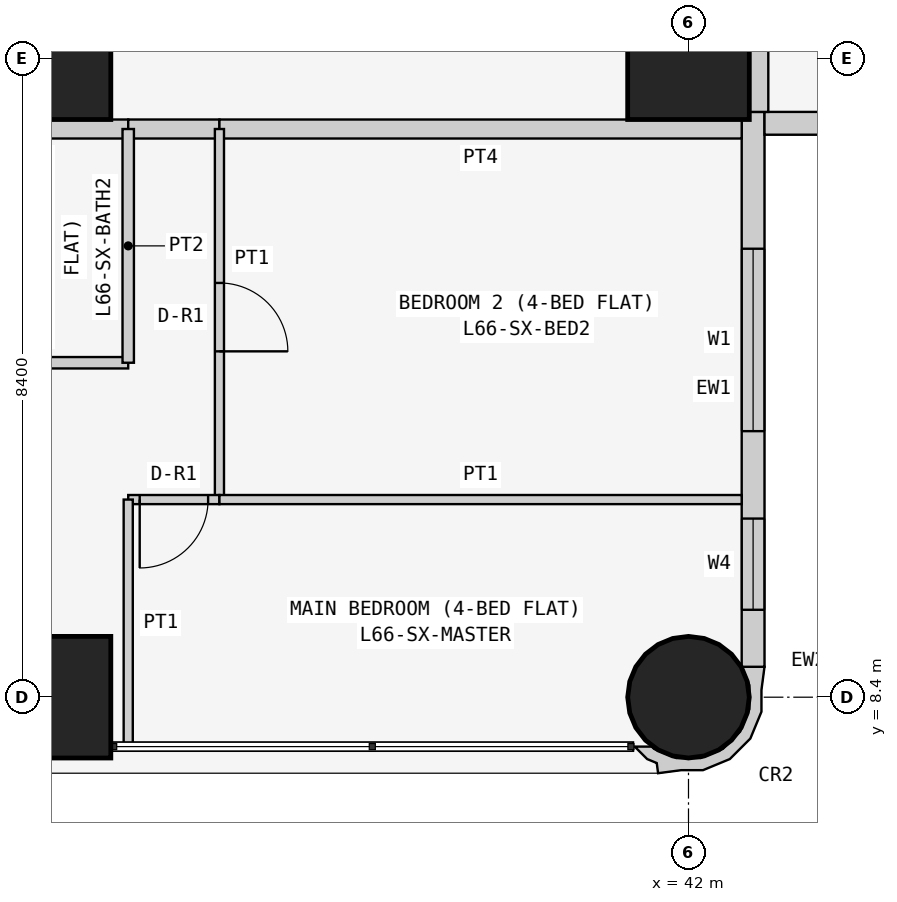
"""IFC4 building model, lengths in metres.
Left out: names, types, materials, properties, quantities, classifications, styles, units other than length and angle.
Written with IfcOpenShell. Run it as: python <this file> out.ifc"""

import sys

from ifc_helpers import new_model, si_unit, direction, frame, frame_2d, origin, origin_2d, place, context, subcontext, project, spatial, polyline, rectangle, circle, outline, extrude, element, fill, save


model = new_model("IFC4")
c1 = context("Model", 3, precision=1e-05, world=origin(), true_north=direction((0.0, 1.0)))
c2 = subcontext(c1, "Body", "Model", "MODEL_VIEW")
j1 = project(units=[si_unit("LENGTHUNIT", "METRE"), si_unit("PLANEANGLEUNIT", "RADIAN")], contexts=[c1])
p1 = place(None, origin())
s1 = spatial("IfcSite", under=j1, at=p1, CompositionType="ELEMENT")
p2 = place(p1, origin())
s2 = spatial("IfcBuilding", under=s1, at=p2, CompositionType="ELEMENT")
p3 = place(p2, frame((0.0, 0.0, 254.1)))
s3 = spatial("IfcBuildingStorey", under=s2, at=p3, CompositionType="ELEMENT", Elevation=254.1)
for number, where, z_axis, x_axis in (
    (1, (33.6, 8.4, 0.0), (0.0, 0.0, 1.0), (1.0, 0.0, 0.0)),
    (2, (33.6, 16.8, 0.0), (0.0, 0.0, 1.0), (1.0, 0.0, 0.0)),
):
    element("IfcColumn", number, at=place(p3, frame(where, z_axis=z_axis, x_axis=x_axis)), inside=s3, PredefinedType="COLUMN", context=c2, shape_type="SweptSolid", body=[
        extrude(rectangle(XDim=1.6, YDim=1.6, at=origin_2d()), origin(), (0.0, 0.0, 1.0), 3.6),
    ])
p4 = place(p3, frame((42.0, 8.4, 0.0), z_axis=(0.0, 0.0, 1.0), x_axis=(1.0, 0.0, 0.0)))
e3 = element("IfcColumn", 3, at=p4, inside=s3, PredefinedType="COLUMN", context=c2, shape_type="SweptSolid", body=[
    extrude(circle(Radius=0.8, at=origin_2d()), origin(), (0.0, 0.0, 1.0), 3.6),
])
p5 = place(p3, frame((42.0, 16.8, 0.0), z_axis=(0.0, 0.0, 1.0), x_axis=(1.0, 0.0, 0.0)))
e4 = element("IfcColumn", 4, at=p5, inside=s3, PredefinedType="COLUMN", context=c2, shape_type="SweptSolid", body=[
    extrude(rectangle(XDim=1.6, YDim=1.6, at=origin_2d()), origin(), (0.0, 0.0, 1.0), 3.6),
])
p6 = place(p3, frame((42.85, 8.8, 0.0), z_axis=(0.0, 0.0, 1.0), x_axis=(0.0, 1.0, 0.0)))
e5 = element("IfcWall", 5, at=p6, inside=s3, PredefinedType="SOLIDWALL", context=c2, shape_type="SweptSolid", body=[
    extrude(rectangle(XDim=7.3, YDim=0.3, at=frame_2d((3.65, 0.0))), origin(), (0.0, 0.0, 1.0), 3.45),
])
p7 = place(p6, frame((3.1, 0.0, 0.9)))
e6 = element("IfcOpeningElement", 6, at=p7, cuts=e5, PredefinedType="OPENING", context=c2, shape_type="SweptSolid", body=[
    extrude(rectangle(XDim=2.4, YDim=1.5, at=frame_2d((1.2, 0.75))), frame((0.0, 0.16, 0.0), z_axis=(0.0, -1.0, 0.0), x_axis=(1.0, 0.0, 0.0)), (0.0, 0.0, 1.0), 0.32),
])
p8 = place(p6, frame((0.75, 0.0, 0.9)))
e7 = element("IfcOpeningElement", 7, at=p8, cuts=e5, PredefinedType="OPENING", context=c2, shape_type="SweptSolid", body=[
    extrude(rectangle(XDim=1.2, YDim=1.5, at=frame_2d((0.6, 0.75))), frame((0.0, 0.16, 0.0), z_axis=(0.0, -1.0, 0.0), x_axis=(1.0, 0.0, 0.0)), (0.0, 0.0, 1.0), 0.32),
])
p9 = place(p3, frame((43.0, 15.95, 0.0), z_axis=(0.0, 0.0, 1.0), x_axis=(1.0, 0.0, 0.0)))
e8 = element("IfcWall", 8, at=p9, inside=s3, PredefinedType="SOLIDWALL", context=c2, shape_type="SweptSolid", body=[
    extrude(rectangle(XDim=7.0, YDim=0.3, at=frame_2d((3.5, 0.0))), origin(), (0.0, 0.0, 1.0), 3.45),
])
p10 = place(p9, frame((1.5, 0.0, 0.9)))
e9 = element("IfcOpeningElement", 9, at=p10, cuts=e8, PredefinedType="OPENING", context=c2, shape_type="SweptSolid", body=[
    extrude(rectangle(XDim=2.4, YDim=1.5, at=frame_2d((1.2, 0.75))), frame((0.0, 0.16, 0.0), z_axis=(0.0, -1.0, 0.0), x_axis=(1.0, 0.0, 0.0)), (0.0, 0.0, 1.0), 0.32),
])
p11 = place(p9, frame((5.05, 0.0, 0.9)))
e10 = element("IfcOpeningElement", 10, at=p11, cuts=e8, PredefinedType="OPENING", context=c2, shape_type="SweptSolid", body=[
    extrude(rectangle(XDim=1.2, YDim=1.5, at=frame_2d((0.6, 0.75))), frame((0.0, 0.16, 0.0), z_axis=(0.0, -1.0, 0.0), x_axis=(1.0, 0.0, 0.0)), (0.0, 0.0, 1.0), 0.32),
])
p12 = place(p3, frame((41.352, 7.805, 0.0), z_axis=(0.0, 0.0, 1.0), x_axis=(0.343276641956, -0.93923434088, 0.0)))
e11 = element("IfcWall", 11, at=p12, inside=s3, PredefinedType="SOLIDWALL", context=c2, shape_type="SweptSolid", body=[
    extrude(outline(polyline([(-0.369, 1.89), (-0.509, 1.621), (-0.49, 1.615), (-0.479, 1.609), (-0.211, 1.62), (0.088, 1.511), (0.323, 1.295), (0.457, 1.006), (0.47, 0.688), (0.361, 0.389), (0.145, 0.154), (0.108, 0.136), (0.031, -0.075), (0.241, 0.023), (0.333, 0.124), (0.465, 0.094), (0.532, 0.393), (0.631, 0.663), (0.614, 1.044), (0.453, 1.391), (0.172, 1.649), (-0.097, 1.748), (-0.369, 1.89)])), origin(), (0.0, 0.0, 1.0), 3.45),
])
p13 = place(p3, frame((42.925, 22.971, 0.0), z_axis=(0.0, 0.0, 1.0), x_axis=(0.0, -1.0, 0.0)))
e12 = element("IfcWall", 12, at=p13, inside=s3, PredefinedType="PARTITIONING", context=c2, shape_type="SweptSolid", body=[
    extrude(rectangle(XDim=6.871, YDim=0.25, at=frame_2d((3.436, 0.0))), origin(), (0.0, 0.0, 1.0), 3.45),
])
p14 = place(p3, frame((34.629, 15.875, 0.0), z_axis=(0.0, 0.0, 1.0), x_axis=(-1.0, 0.0, 0.0)))
e13 = element("IfcWall", 13, at=p14, inside=s3, PredefinedType="PARTITIONING", context=c2, shape_type="SweptSolid", body=[
    extrude(rectangle(XDim=2.629, YDim=0.25, at=frame_2d((1.314, 0.0))), origin(), (0.0, 0.0, 1.0), 3.45),
])
p15 = place(p3, frame((35.829, 15.875, 0.0), z_axis=(0.0, 0.0, 1.0), x_axis=(-1.0, 0.0, 0.0)))
e14 = element("IfcWall", 14, at=p15, inside=s3, PredefinedType="PARTITIONING", context=c2, shape_type="SweptSolid", body=[
    extrude(rectangle(XDim=1.2, YDim=0.25, at=frame_2d((0.6, 0.0))), origin(), (0.0, 0.0, 1.0), 3.45),
])
p16 = place(p3, frame((42.7, 15.875, 0.0), z_axis=(0.0, 0.0, 1.0), x_axis=(-1.0, 0.0, 0.0)))
e15 = element("IfcWall", 15, at=p16, inside=s3, PredefinedType="PARTITIONING", context=c2, shape_type="SweptSolid", body=[
    extrude(rectangle(XDim=6.871, YDim=0.25, at=frame_2d((3.436, 0.0))), origin(), (0.0, 0.0, 1.0), 3.45),
])
p17 = place(p3, frame((32.0, 12.8, 0.0), z_axis=(0.0, 0.0, 1.0), x_axis=(1.0, 0.0, 0.0)))
e16 = element("IfcWall", 16, at=p17, inside=s3, PredefinedType="PARTITIONING", context=c2, shape_type="SweptSolid", body=[
    extrude(rectangle(XDim=2.629, YDim=0.15, at=frame_2d((1.314, 0.0))), origin(), (0.0, 0.0, 1.0), 3.45),
])
p18 = place(p3, frame((34.629, 12.8, 0.0), z_axis=(0.0, 0.0, 1.0), x_axis=(0.0, 1.0, 0.0)))
e17 = element("IfcWall", 17, at=p18, inside=s3, PredefinedType="PARTITIONING", context=c2, shape_type="SweptSolid", body=[
    extrude(rectangle(XDim=3.075, YDim=0.15, at=frame_2d((1.538, 0.0))), origin(), (0.0, 0.0, 1.0), 3.45),
])
p19 = place(p3, frame((35.829, 15.875, 0.0), z_axis=(0.0, 0.0, 1.0), x_axis=(0.0, -1.0, 0.0)))
e18 = element("IfcWall", 18, at=p19, inside=s3, PredefinedType="PARTITIONING", context=c2, shape_type="SweptSolid", body=[
    extrude(rectangle(XDim=4.875, YDim=0.12, at=frame_2d((2.438, 0.0))), origin(), (0.0, 0.0, 1.0), 3.45),
])
p20 = place(p19, frame((2.025, 0.0, 0.0)))
e19 = element("IfcOpeningElement", 19, at=p20, cuts=e18, PredefinedType="OPENING", context=c2, shape_type="SweptSolid", body=[
    extrude(rectangle(XDim=0.9, YDim=2.1, at=frame_2d((0.45, 1.05))), frame((0.0, 0.07, 0.0), z_axis=(0.0, -1.0, 0.0), x_axis=(1.0, 0.0, 0.0)), (0.0, 0.0, 1.0), 0.14),
])
p21 = place(p3, frame((35.829, 11.0, 0.0), z_axis=(0.0, 0.0, 1.0), x_axis=(-1.0, 0.0, 0.0)))
e20 = element("IfcWall", 20, at=p21, inside=s3, PredefinedType="PARTITIONING", context=c2, shape_type="SweptSolid", body=[
    extrude(rectangle(XDim=1.2, YDim=0.12, at=frame_2d((0.6, 0.0))), origin(), (0.0, 0.0, 1.0), 3.45),
])
p22 = place(p21, frame((0.149, 0.0, 0.0)))
e21 = element("IfcOpeningElement", 21, at=p22, cuts=e20, PredefinedType="OPENING", context=c2, shape_type="SweptSolid", body=[
    extrude(rectangle(XDim=0.9, YDim=2.1, at=frame_2d((0.45, 1.05))), frame((0.0, 0.07, 0.0), z_axis=(0.0, -1.0, 0.0), x_axis=(1.0, 0.0, 0.0)), (0.0, 0.0, 1.0), 0.14),
])
p23 = place(p3, frame((34.629, 11.0, 0.0), z_axis=(0.0, 0.0, 1.0), x_axis=(0.0, -1.0, 0.0)))
e22 = element("IfcWall", 22, at=p23, inside=s3, PredefinedType="PARTITIONING", context=c2, shape_type="SweptSolid", body=[
    extrude(rectangle(XDim=3.25, YDim=0.12, at=frame_2d((1.625, 0.0))), origin(), (0.0, 0.0, 1.0), 3.45),
])
p24 = place(p3, frame((35.829, 11.0, 0.0), z_axis=(0.0, 0.0, 1.0), x_axis=(1.0, 0.0, 0.0)))
e23 = element("IfcWall", 23, at=p24, inside=s3, PredefinedType="PARTITIONING", context=c2, shape_type="SweptSolid", body=[
    extrude(rectangle(XDim=6.871, YDim=0.12, at=frame_2d((3.436, 0.0))), origin(), (0.0, 0.0, 1.0), 3.45),
])
p25 = place(p7, origin())
e24 = element("IfcWindow", 24, at=p25, inside=s3, PartitioningType="SINGLE_PANEL", PredefinedType="WINDOW", context=c2, shape_type="SweptSolid", body=[
    extrude(rectangle(XDim=2.4, YDim=1.5, at=frame_2d((1.2, 0.75))), frame((0.0, 0.03, 0.0), z_axis=(0.0, -1.0, 0.0), x_axis=(1.0, 0.0, 0.0)), (0.0, 0.0, 1.0), 0.06),
])
fill(e6, e24)
p26 = place(p8, origin())
e25 = element("IfcWindow", 25, at=p26, inside=s3, PartitioningType="SINGLE_PANEL", PredefinedType="WINDOW", context=c2, shape_type="SweptSolid", body=[
    extrude(rectangle(XDim=1.2, YDim=1.5, at=frame_2d((0.6, 0.75))), frame((0.0, 0.03, 0.0), z_axis=(0.0, -1.0, 0.0), x_axis=(1.0, 0.0, 0.0)), (0.0, 0.0, 1.0), 0.06),
])
fill(e7, e25)
p27 = place(p20, origin())
e26 = element("IfcDoor", 26, at=p27, inside=s3, OperationType="SINGLE_SWING_RIGHT", PredefinedType="DOOR", context=c2, shape_type="SweptSolid", body=[
    extrude(rectangle(XDim=0.9, YDim=2.1, at=frame_2d((0.45, 1.05))), frame((0.0, 0.025, 0.0), z_axis=(0.0, -1.0, 0.0), x_axis=(1.0, 0.0, 0.0)), (0.0, 0.0, 1.0), 0.05),
])
fill(e19, e26)
p28 = place(p22, origin())
e27 = element("IfcDoor", 27, at=p28, inside=s3, OperationType="SINGLE_SWING_RIGHT", PredefinedType="DOOR", context=c2, shape_type="SweptSolid", body=[
    extrude(rectangle(XDim=0.9, YDim=2.1, at=frame_2d((0.45, 1.05))), frame((0.0, 0.025, 0.0), z_axis=(0.0, -1.0, 0.0), x_axis=(1.0, 0.0, 0.0)), (0.0, 0.0, 1.0), 0.05),
])
fill(e21, e27)
save(model, sys.argv[1])
